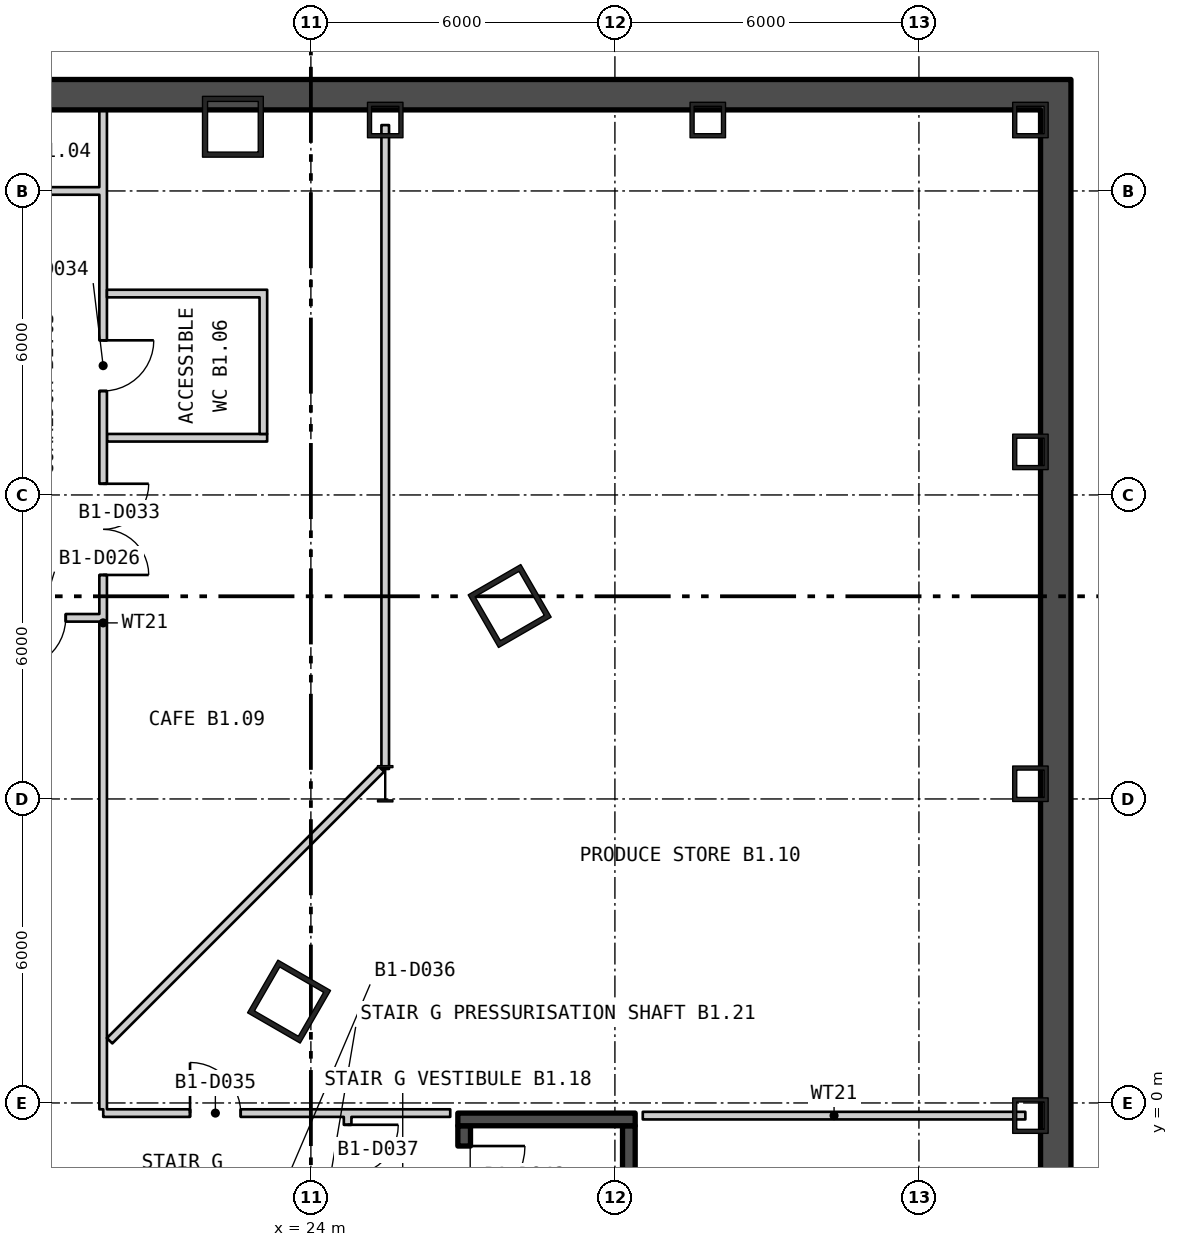
"""IFC4 building model, lengths in metres.
Left out: names, types, materials, properties, quantities, classifications, styles, units other than length and angle.
Written with IfcOpenShell. Run it as: python <this file> out.ifc"""

import sys

from ifc_helpers import new_model, si_unit, direction, frame, frame_2d, origin, origin_2d, place, context, subcontext, project, spatial, rectangle, hollow_rectangle, i_section, extrude, element, fill, save


model = new_model("IFC4")
c1 = context("Model", 3, precision=1e-05, world=origin(), true_north=direction((0.0, 1.0)))
c2 = subcontext(c1, "Body", "Model", "MODEL_VIEW")
j1 = project(units=[si_unit("LENGTHUNIT", "METRE"), si_unit("PLANEANGLEUNIT", "RADIAN")], contexts=[c1])
p1 = place(None, origin())
s1 = spatial("IfcSite", under=j1, at=p1, CompositionType="ELEMENT")
p2 = place(p1, origin())
s2 = spatial("IfcBuilding", under=s1, at=p2, CompositionType="ELEMENT")
p3 = place(p2, frame((0.0, 0.0, -5.7)))
s3 = spatial("IfcBuildingStorey", under=s2, at=p3, CompositionType="ELEMENT", Elevation=-5.7)
for number, where, z_axis, x_axis in (
    (1, (22.461, 19.267, 0.0), (0.0, 0.0, 1.0), (-1.0, 0.0, 0.0)),
    (2, (23.569, 2.0, 0.0), (0.0, 0.0, 1.0), (0.5, 0.866, 0.0)),
    (3, (27.923, 9.808, 0.0), (0.0, 0.0, 1.0), (-0.5, 0.866, 0.0)),
):
    element("IfcColumn", number, at=place(p3, frame(where, z_axis=z_axis, x_axis=x_axis)), inside=s3, PredefinedType="COLUMN", context=c2, shape_type="SweptSolid", body=[
        extrude(hollow_rectangle(XDim=1.2, YDim=1.2, WallThickness=0.1, at=origin_2d()), origin(), (0.0, 0.0, 1.0), 5.7),
    ])
for number, where, z_axis, x_axis in (
    (4, (38.2, -0.25, 0.0), (0.0, 0.0, 1.0), (0.0, 1.0, 0.0)),
    (5, (38.2, 6.3, 0.0), (0.0, 0.0, 1.0), (0.0, 1.0, 0.0)),
    (6, (38.2, 12.85, 0.0), (0.0, 0.0, 1.0), (0.0, 1.0, 0.0)),
    (7, (38.2, 19.4, 0.0), (0.0, 0.0, 1.0), (-1.0, 0.0, 0.0)),
    (8, (31.833, 19.4, 0.0), (0.0, 0.0, 1.0), (-1.0, 0.0, 0.0)),
    (9, (25.467, 19.4, 0.0), (0.0, 0.0, 1.0), (-1.0, 0.0, 0.0)),
):
    element("IfcColumn", number, at=place(p3, frame(where, z_axis=z_axis, x_axis=x_axis)), inside=s3, PredefinedType="COLUMN", context=c2, shape_type="SweptSolid", body=[
        extrude(hollow_rectangle(XDim=0.7, YDim=0.7, WallThickness=0.08, at=origin_2d()), origin(), (0.0, 0.0, 1.0), 5.7),
    ])
p4 = place(p3, frame((25.467, 6.3, 0.0), z_axis=(0.0, 0.0, 1.0), x_axis=(1.0, 0.0, 0.0)))
e10 = element("IfcColumn", 10, at=p4, inside=s3, PredefinedType="COLUMN", context=c2, shape_type="SweptSolid", body=[
    extrude(i_section(OverallWidth=0.304, OverallDepth=0.716, WebThickness=0.021, FlangeThickness=0.04, at=origin_2d()), origin(), (0.0, 0.0, 1.0), 5.25),
])
p5 = place(p3, frame((-39.0, 19.9, -0.4), z_axis=(0.0, 0.0, 1.0), x_axis=(1.0, 0.0, 0.0)))
e11 = element("IfcWall", 11, at=p5, inside=s3, PredefinedType="STANDARD", context=c2, shape_type="SweptSolid", body=[
    extrude(rectangle(XDim=78.0, YDim=0.6, at=frame_2d((39.0, 0.0))), origin(), (0.0, 0.0, 1.0), 5.7),
])
p6 = place(p3, frame((38.7, -33.2, -0.4), z_axis=(0.0, 0.0, 1.0), x_axis=(0.0, 1.0, 0.0)))
e12 = element("IfcWall", 12, at=p6, inside=s3, PredefinedType="STANDARD", context=c2, shape_type="SweptSolid", body=[
    extrude(rectangle(XDim=52.8, YDim=0.6, at=frame_2d((26.4, 0.0))), origin(), (0.0, 0.0, 1.0), 5.7),
])
p7 = place(p3, frame((27.025, -7.75, 0.0), z_axis=(0.0, 0.0, 1.0), x_axis=(0.0, 1.0, 0.0)))
e13 = element("IfcWall", 13, at=p7, inside=s3, PredefinedType="SHEAR", context=c2, shape_type="SweptSolid", body=[
    extrude(rectangle(XDim=7.3, YDim=0.25, at=frame_2d((3.65, 0.0))), origin(), (0.0, 0.0, 1.0), 5.25),
])
p8 = place(p7, frame((5.7, 0.0, 0.0)))
e14 = element("IfcOpeningElement", 14, at=p8, cuts=e13, PredefinedType="OPENING", context=c2, shape_type="SweptSolid", body=[
    extrude(rectangle(XDim=1.2, YDim=2.1, at=frame_2d((0.6, 1.05))), frame((0.0, 0.135, 0.0), z_axis=(0.0, -1.0, 0.0), x_axis=(1.0, 0.0, 0.0)), (0.0, 0.0, 1.0), 0.27),
])
p9 = place(p3, frame((30.275, -7.75, 0.0), z_axis=(0.0, 0.0, 1.0), x_axis=(0.0, 1.0, 0.0)))
e15 = element("IfcWall", 15, at=p9, inside=s3, PredefinedType="SHEAR", context=c2, shape_type="SweptSolid", body=[
    extrude(rectangle(XDim=7.3, YDim=0.25, at=frame_2d((3.65, 0.0))), origin(), (0.0, 0.0, 1.0), 5.25),
])
p10 = place(p3, frame((26.9, -0.325, 0.0), z_axis=(0.0, 0.0, 1.0), x_axis=(1.0, 0.0, 0.0)))
e16 = element("IfcWall", 16, at=p10, inside=s3, PredefinedType="SHEAR", context=c2, shape_type="SweptSolid", body=[
    extrude(rectangle(XDim=3.5, YDim=0.25, at=frame_2d((1.75, 0.0))), origin(), (0.0, 0.0, 1.0), 5.25),
])
p11 = place(p3, frame((17.5, 9.575, 0.0), z_axis=(0.0, 0.0, 1.0), x_axis=(1.0, 0.0, 0.0)))
e17 = element("IfcWall", 17, at=p11, inside=s3, PredefinedType="PARTITIONING", context=c2, shape_type="SweptSolid", body=[
    extrude(rectangle(XDim=2.325, YDim=0.15, at=frame_2d((1.163, 0.0))), origin(), (0.0, 0.0, 1.0), 5.25),
])
p12 = place(p11, frame((0.662, 0.0, 0.0)))
e18 = element("IfcOpeningElement", 18, at=p12, cuts=e17, PredefinedType="OPENING", context=c2, shape_type="SweptSolid", body=[
    extrude(rectangle(XDim=1.0, YDim=2.1, at=frame_2d((0.5, 1.05))), frame((0.0, 0.085, 0.0), z_axis=(0.0, -1.0, 0.0), x_axis=(1.0, 0.0, 0.0)), (0.0, 0.0, 1.0), 0.17),
])
p13 = place(p3, frame((17.5, 18.0, 0.0), z_axis=(0.0, 0.0, 1.0), x_axis=(1.0, 0.0, 0.0)))
e19 = element("IfcWall", 19, at=p13, inside=s3, PredefinedType="PARTITIONING", context=c2, shape_type="SweptSolid", body=[
    extrude(rectangle(XDim=2.475, YDim=0.15, at=frame_2d((1.238, 0.0))), origin(), (0.0, 0.0, 1.0), 5.25),
])
p14 = place(p3, frame((19.9, -0.125, 0.0), z_axis=(0.0, 0.0, 1.0), x_axis=(0.0, 1.0, 0.0)))
e20 = element("IfcWall", 20, at=p14, inside=s3, PredefinedType="PARTITIONING", context=c2, shape_type="SweptSolid", body=[
    extrude(rectangle(XDim=1.15, YDim=0.15, at=frame_2d((0.575, 0.0))), origin(), (0.0, 0.0, 1.0), 5.25),
])
p15 = place(p3, frame((19.9, 1.025, 0.0), z_axis=(0.0, 0.0, 1.0), x_axis=(0.0, 1.0, 0.0)))
e21 = element("IfcWall", 21, at=p15, inside=s3, PredefinedType="PARTITIONING", context=c2, shape_type="SweptSolid", body=[
    extrude(rectangle(XDim=16.9, YDim=0.15, at=frame_2d((8.45, 0.0))), origin(), (0.0, 0.0, 1.0), 5.25),
])
p16 = place(p15, frame((9.396, 0.0, 0.0)))
e22 = element("IfcOpeningElement", 22, at=p16, cuts=e21, PredefinedType="OPENING", context=c2, shape_type="SweptSolid", body=[
    extrude(rectangle(XDim=1.8, YDim=2.1, at=frame_2d((0.9, 1.05))), frame((0.0, 0.085, 0.0), z_axis=(0.0, -1.0, 0.0), x_axis=(1.0, 0.0, 0.0)), (0.0, 0.0, 1.0), 0.17),
])
p17 = place(p15, frame((13.027, 0.0, 0.0)))
e23 = element("IfcOpeningElement", 23, at=p17, cuts=e21, PredefinedType="OPENING", context=c2, shape_type="SweptSolid", body=[
    extrude(rectangle(XDim=1.0, YDim=2.1, at=frame_2d((0.5, 1.05))), frame((0.0, 0.085, 0.0), z_axis=(0.0, -1.0, 0.0), x_axis=(1.0, 0.0, 0.0)), (0.0, 0.0, 1.0), 0.17),
])
p18 = place(p3, frame((19.9, 18.075, 0.0), z_axis=(0.0, 0.0, 1.0), x_axis=(0.0, 1.0, 0.0)))
e24 = element("IfcWall", 24, at=p18, inside=s3, PredefinedType="PARTITIONING", context=c2, shape_type="SweptSolid", body=[
    extrude(rectangle(XDim=1.675, YDim=0.15, at=frame_2d((0.838, 0.0))), origin(), (0.0, 0.0, 1.0), 5.25),
])
p19 = place(p3, frame((19.902, -0.2, 0.0), z_axis=(0.0, 0.0, 1.0), x_axis=(1.0, 0.0, 0.0)))
e25 = element("IfcWall", 25, at=p19, inside=s3, PredefinedType="PARTITIONING", context=c2, shape_type="SweptSolid", body=[
    extrude(rectangle(XDim=6.848, YDim=0.15, at=frame_2d((3.424, 0.0))), origin(), (0.0, 0.0, 1.0), 5.25),
])
p20 = place(p19, frame((1.713, 0.0, 0.0)))
e26 = element("IfcOpeningElement", 26, at=p20, cuts=e25, PredefinedType="OPENING", context=c2, shape_type="SweptSolid", body=[
    extrude(rectangle(XDim=1.0, YDim=2.1, at=frame_2d((0.5, 1.05))), frame((0.0, 0.085, 0.0), z_axis=(0.0, -1.0, 0.0), x_axis=(1.0, 0.0, 0.0)), (0.0, 0.0, 1.0), 0.17),
])
for number, where, z_axis, x_axis in (
    (27, (19.975, 13.129, 0.0), (0.0, 0.0, 1.0), (1.0, 0.0, 0.0)),
    (28, (19.975, 15.975, 0.0), (0.0, 0.0, 1.0), (1.0, 0.0, 0.0)),
):
    element("IfcWall", number, at=place(p3, frame(where, z_axis=z_axis, x_axis=x_axis)), inside=s3, PredefinedType="PARTITIONING", context=c2, shape_type="SweptSolid", body=[
        extrude(rectangle(XDim=3.162, YDim=0.15, at=frame_2d((1.581, 0.0))), origin(), (0.0, 0.0, 1.0), 5.25),
    ])
p21 = place(p3, frame((20.028, 1.228, 0.0), z_axis=(0.0, 0.0, 1.0), x_axis=(0.707106781187, 0.707106781187, 0.0)))
e29 = element("IfcWall", 29, at=p21, inside=s3, PredefinedType="PARTITIONING", context=c2, shape_type="SweptSolid", body=[
    extrude(rectangle(XDim=7.586, YDim=0.15, at=frame_2d((3.793, 0.0))), origin(), (0.0, 0.0, 1.0), 5.25),
])
p22 = place(p3, frame((23.062, 13.204, 0.0), z_axis=(0.0, 0.0, 1.0), x_axis=(0.0, 1.0, 0.0)))
e30 = element("IfcWall", 30, at=p22, inside=s3, PredefinedType="PARTITIONING", context=c2, shape_type="SweptSolid", body=[
    extrude(rectangle(XDim=2.696, YDim=0.15, at=frame_2d((1.348, 0.0))), origin(), (0.0, 0.0, 1.0), 5.25),
])
p23 = place(p3, frame((24.725, -1.588, 0.0), z_axis=(0.0, 0.0, 1.0), x_axis=(0.0, 1.0, 0.0)))
e31 = element("IfcWall", 31, at=p23, inside=s3, PredefinedType="PARTITIONING", context=c2, shape_type="SweptSolid", body=[
    extrude(rectangle(XDim=1.313, YDim=0.15, at=frame_2d((0.656, 0.0))), origin(), (0.0, 0.0, 1.0), 5.25),
])
p24 = place(p23, frame((0.157, 0.0, 0.0)))
e32 = element("IfcOpeningElement", 32, at=p24, cuts=e31, PredefinedType="OPENING", context=c2, shape_type="SweptSolid", body=[
    extrude(rectangle(XDim=1.0, YDim=2.1, at=frame_2d((0.5, 1.05))), frame((0.0, 0.085, 0.0), z_axis=(0.0, -1.0, 0.0), x_axis=(1.0, 0.0, 0.0)), (0.0, 0.0, 1.0), 0.17),
])
p25 = place(p3, frame((25.467, 6.592, 0.0), z_axis=(0.0, 0.0, 1.0), x_axis=(0.0, 1.0, 0.0)))
e33 = element("IfcWall", 33, at=p25, inside=s3, PredefinedType="PARTITIONING", context=c2, shape_type="SweptSolid", body=[
    extrude(rectangle(XDim=12.708, YDim=0.15, at=frame_2d((6.354, 0.0))), origin(), (0.0, 0.0, 1.0), 5.25),
])
p26 = place(p3, frame((30.55, -0.25, 0.0), z_axis=(0.0, 0.0, 1.0), x_axis=(1.0, 0.0, 0.0)))
e34 = element("IfcWall", 34, at=p26, inside=s3, PredefinedType="PARTITIONING", context=c2, shape_type="SweptSolid", body=[
    extrude(rectangle(XDim=7.55, YDim=0.15, at=frame_2d((3.775, 0.0))), origin(), (0.0, 0.0, 1.0), 5.25),
])
p27 = place(p8, origin())
e35 = element("IfcDoor", 35, at=p27, inside=s3, OperationType="SINGLE_SWING_RIGHT", PredefinedType="DOOR", context=c2, shape_type="SweptSolid", body=[
    extrude(rectangle(XDim=1.2, YDim=2.1, at=frame_2d((0.6, 1.05))), frame((0.0, 0.025, 0.0), z_axis=(0.0, -1.0, 0.0), x_axis=(1.0, 0.0, 0.0)), (0.0, 0.0, 1.0), 0.05),
])
fill(e14, e35)
p28 = place(p12, origin())
e36 = element("IfcDoor", 36, at=p28, inside=s3, OperationType="SINGLE_SWING_LEFT", PredefinedType="DOOR", context=c2, shape_type="SweptSolid", body=[
    extrude(rectangle(XDim=1.0, YDim=2.1, at=frame_2d((0.5, 1.05))), frame((0.0, 0.025, 0.0), z_axis=(0.0, -1.0, 0.0), x_axis=(1.0, 0.0, 0.0)), (0.0, 0.0, 1.0), 0.05),
])
fill(e18, e36)
p29 = place(p16, origin())
e37 = element("IfcDoor", 37, at=p29, inside=s3, OperationType="DOUBLE_DOOR_SINGLE_SWING", PredefinedType="DOOR", context=c2, shape_type="SweptSolid", body=[
    extrude(rectangle(XDim=1.8, YDim=2.1, at=frame_2d((0.9, 1.05))), frame((0.0, 0.025, 0.0), z_axis=(0.0, -1.0, 0.0), x_axis=(1.0, 0.0, 0.0)), (0.0, 0.0, 1.0), 0.05),
])
fill(e22, e37)
p30 = place(p17, origin())
e38 = element("IfcDoor", 38, at=p30, inside=s3, OperationType="SINGLE_SWING_RIGHT", PredefinedType="DOOR", context=c2, shape_type="SweptSolid", body=[
    extrude(rectangle(XDim=1.0, YDim=2.1, at=frame_2d((0.5, 1.05))), frame((0.0, 0.025, 0.0), z_axis=(0.0, -1.0, 0.0), x_axis=(1.0, 0.0, 0.0)), (0.0, 0.0, 1.0), 0.05),
])
fill(e23, e38)
p31 = place(p20, origin())
e39 = element("IfcDoor", 39, at=p31, inside=s3, OperationType="SINGLE_SWING_RIGHT", PredefinedType="DOOR", context=c2, shape_type="SweptSolid", body=[
    extrude(rectangle(XDim=1.0, YDim=2.1, at=frame_2d((0.5, 1.05))), frame((0.0, 0.025, 0.0), z_axis=(0.0, -1.0, 0.0), x_axis=(1.0, 0.0, 0.0)), (0.0, 0.0, 1.0), 0.05),
])
fill(e26, e39)
p32 = place(p24, origin())
e40 = element("IfcDoor", 40, at=p32, inside=s3, OperationType="SINGLE_SWING_RIGHT", PredefinedType="DOOR", context=c2, shape_type="SweptSolid", body=[
    extrude(rectangle(XDim=1.0, YDim=2.1, at=frame_2d((0.5, 1.05))), frame((0.0, 0.025, 0.0), z_axis=(0.0, -1.0, 0.0), x_axis=(1.0, 0.0, 0.0)), (0.0, 0.0, 1.0), 0.05),
])
fill(e32, e40)
save(model, sys.argv[1])
